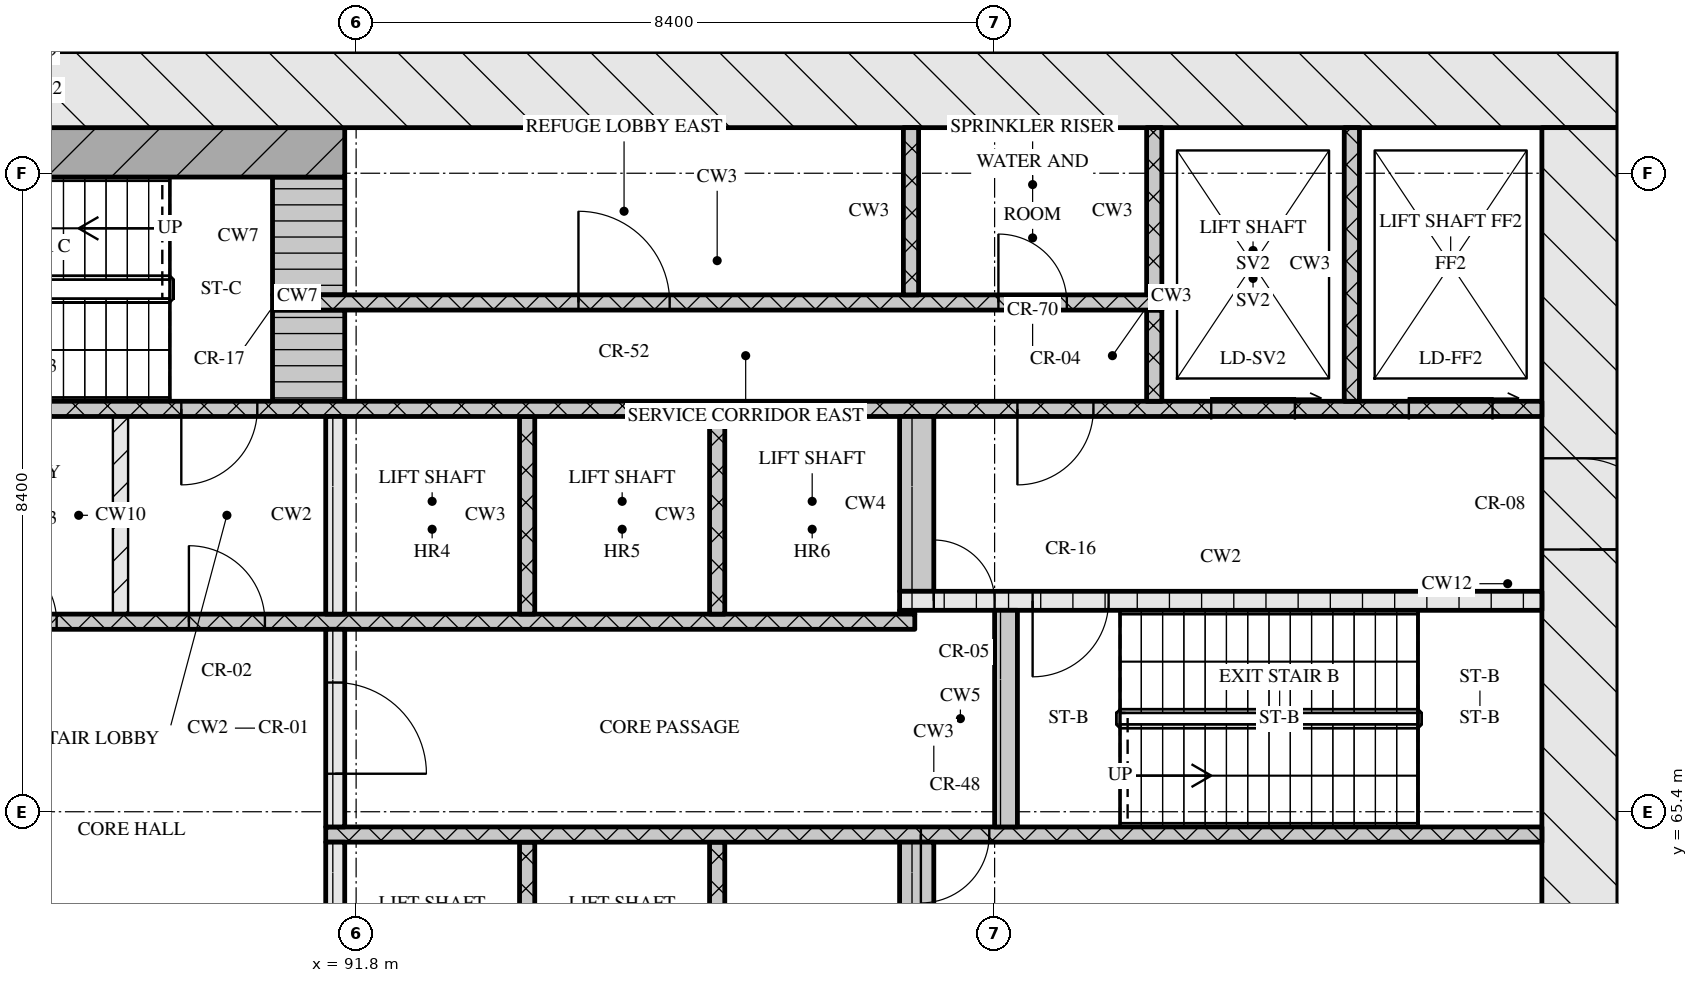
"""IFC4 building model, lengths in metres.
Left out: names, types, materials, properties, quantities, classifications, styles, units other than length and angle.
Written with IfcOpenShell. Run it as: python <this file> out.ifc"""

import sys

from ifc_helpers import new_model, si_unit, direction, frame, frame_2d, origin, place, context, subcontext, project, spatial, rectangle, extrude, element, fill, save


model = new_model("IFC4")
c1 = context("Model", 3, precision=1e-05, world=origin(), true_north=direction((0.0, 1.0)))
c2 = subcontext(c1, "Body", "Model", "MODEL_VIEW")
j1 = project(units=[si_unit("LENGTHUNIT", "METRE"), si_unit("PLANEANGLEUNIT", "RADIAN")], contexts=[c1])
p1 = place(None, origin())
s1 = spatial("IfcSite", under=j1, at=p1, CompositionType="ELEMENT")
p2 = place(p1, origin())
s2 = spatial("IfcBuilding", under=s1, at=p2, CompositionType="ELEMENT")
p3 = place(p2, frame((0.0, 0.0, 84.0)))
s3 = spatial("IfcBuildingStorey", under=s2, at=p3, CompositionType="ELEMENT", Elevation=84.0)
p4 = place(p3, frame((66.8, 74.9, 0.0), z_axis=(0.0, 0.0, 1.0), x_axis=(1.0, 0.0, 0.0)))
e1 = element("IfcWall", 1, at=p4, inside=s3, PredefinedType="SOLIDWALL", context=c2, shape_type="SweptSolid", body=[
    extrude(rectangle(XDim=41.6, YDim=1.0, at=frame_2d((20.8, 0.0))), origin(), (0.0, 0.0, 1.0), 10.97),
])
p5 = place(p3, frame((107.9, 62.4, 0.0), z_axis=(0.0, 0.0, 1.0), x_axis=(0.0, 1.0, 0.0)))
e2 = element("IfcWall", 2, at=p5, inside=s3, PredefinedType="SOLIDWALL", context=c2, shape_type="SweptSolid", body=[
    extrude(rectangle(XDim=12.0, YDim=1.0, at=frame_2d((6.0, 0.0))), origin(), (0.0, 0.0, 1.0), 10.97),
])
p6 = place(p5, frame((6.45, 0.0, 0.0)))
e3 = element("IfcOpeningElement", 3, at=p6, cuts=e2, PredefinedType="OPENING", context=c2, shape_type="SweptSolid", body=[
    extrude(rectangle(XDim=1.2, YDim=2.1, at=frame_2d((0.6, 1.05))), frame((0.0, 0.51, 0.0), z_axis=(0.0, -1.0, 0.0), x_axis=(1.0, 0.0, 0.0)), (0.0, 0.0, 1.0), 1.02),
])
p7 = place(p3, frame((91.525, 62.4, 0.0), z_axis=(0.0, 0.0, 1.0), x_axis=(0.0, 1.0, 0.0)))
e4 = element("IfcWall", 4, at=p7, inside=s3, PredefinedType="SOLIDWALL", context=c2, shape_type="SweptSolid", body=[
    extrude(rectangle(XDim=2.6, YDim=0.25, at=frame_2d((1.3, 0.0))), origin(), (0.0, 0.0, 1.0), 10.97),
])
for number, where, z_axis, x_axis in (
    (5, (94.05, 62.4, 0.0), (0.0, 0.0, 1.0), (0.0, 1.0, 0.0)),
    (6, (96.55, 62.4, 0.0), (0.0, 0.0, 1.0), (0.0, 1.0, 0.0)),
):
    element("IfcWall", number, at=place(p3, frame(where, z_axis=z_axis, x_axis=x_axis)), inside=s3, PredefinedType="SOLIDWALL", context=c2, shape_type="SweptSolid", body=[
        extrude(rectangle(XDim=2.6, YDim=0.2, at=frame_2d((1.3, 0.0))), origin(), (0.0, 0.0, 1.0), 10.97),
    ])
p8 = place(p3, frame((99.175, 62.4, 0.0), z_axis=(0.0, 0.0, 1.0), x_axis=(0.0, 1.0, 0.0)))
e7 = element("IfcWall", 7, at=p8, inside=s3, PredefinedType="SOLIDWALL", context=c2, shape_type="SweptSolid", body=[
    extrude(rectangle(XDim=2.6, YDim=0.45, at=frame_2d((1.3, 0.0))), origin(), (0.0, 0.0, 1.0), 10.97),
])
p9 = place(p3, frame((91.4, 65.1, 0.0), z_axis=(0.0, 0.0, 1.0), x_axis=(1.0, 0.0, 0.0)))
e8 = element("IfcWall", 8, at=p9, inside=s3, PredefinedType="SOLIDWALL", context=c2, shape_type="SweptSolid", body=[
    extrude(rectangle(XDim=16.0, YDim=0.2, at=frame_2d((8.0, 0.0))), origin(), (0.0, 0.0, 1.0), 10.97),
])
p10 = place(p9, frame((7.83, 0.0, 0.0)))
e9 = element("IfcOpeningElement", 9, at=p10, cuts=e8, PredefinedType="OPENING", context=c2, shape_type="SweptSolid", body=[
    extrude(rectangle(XDim=0.9, YDim=2.1, at=frame_2d((0.45, 1.05))), frame((0.0, 0.11, 0.0), z_axis=(0.0, -1.0, 0.0), x_axis=(1.0, 0.0, 0.0)), (0.0, 0.0, 1.0), 0.22),
])
p11 = place(p3, frame((91.525, 65.2, 0.0), z_axis=(0.0, 0.0, 1.0), x_axis=(0.0, 1.0, 0.0)))
e10 = element("IfcWall", 10, at=p11, inside=s3, PredefinedType="SOLIDWALL", context=c2, shape_type="SweptSolid", body=[
    extrude(rectangle(XDim=2.6, YDim=0.25, at=frame_2d((1.3, 0.0))), origin(), (0.0, 0.0, 1.0), 10.97),
])
p12 = place(p11, frame((0.7, 0.0, 0.0)))
e11 = element("IfcOpeningElement", 11, at=p12, cuts=e10, PredefinedType="OPENING", context=c2, shape_type="SweptSolid", body=[
    extrude(rectangle(XDim=1.2, YDim=2.1, at=frame_2d((0.6, 1.05))), frame((0.0, 0.135, 0.0), z_axis=(0.0, -1.0, 0.0), x_axis=(1.0, 0.0, 0.0)), (0.0, 0.0, 1.0), 0.27),
])
p13 = place(p3, frame((100.35, 65.2, 0.0), z_axis=(0.0, 0.0, 1.0), x_axis=(0.0, 1.0, 0.0)))
e12 = element("IfcWall", 12, at=p13, inside=s3, PredefinedType="SOLIDWALL", context=c2, shape_type="SweptSolid", body=[
    extrude(rectangle(XDim=2.85, YDim=0.3, at=frame_2d((1.425, 0.0))), origin(), (0.0, 0.0, 1.0), 10.97),
])
p14 = place(p3, frame((76.05, 67.9, 0.0), z_axis=(0.0, 0.0, 1.0), x_axis=(1.0, 0.0, 0.0)))
e13 = element("IfcWall", 13, at=p14, inside=s3, PredefinedType="SOLIDWALL", context=c2, shape_type="SweptSolid", body=[
    extrude(rectangle(XDim=23.1, YDim=0.2, at=frame_2d((11.55, 0.0))), origin(), (0.0, 0.0, 1.0), 10.97),
])
p15 = place(p14, frame((0.6, 0.0, 0.0)))
e14 = element("IfcOpeningElement", 14, at=p15, cuts=e13, PredefinedType="OPENING", context=c2, shape_type="SweptSolid", body=[
    extrude(rectangle(XDim=1.1, YDim=2.1, at=frame_2d((0.55, 1.05))), frame((0.0, 0.11, 0.0), z_axis=(0.0, -1.0, 0.0), x_axis=(1.0, 0.0, 0.0)), (0.0, 0.0, 1.0), 0.22),
])
p16 = place(p14, frame((3.1, 0.0, 0.0)))
e15 = element("IfcOpeningElement", 15, at=p16, cuts=e13, PredefinedType="OPENING", context=c2, shape_type="SweptSolid", body=[
    extrude(rectangle(XDim=1.1, YDim=2.1, at=frame_2d((0.55, 1.05))), frame((0.0, 0.11, 0.0), z_axis=(0.0, -1.0, 0.0), x_axis=(1.0, 0.0, 0.0)), (0.0, 0.0, 1.0), 0.22),
])
p17 = place(p14, frame((5.6, 0.0, 0.0)))
e16 = element("IfcOpeningElement", 16, at=p17, cuts=e13, PredefinedType="OPENING", context=c2, shape_type="SweptSolid", body=[
    extrude(rectangle(XDim=1.1, YDim=2.1, at=frame_2d((0.55, 1.05))), frame((0.0, 0.11, 0.0), z_axis=(0.0, -1.0, 0.0), x_axis=(1.0, 0.0, 0.0)), (0.0, 0.0, 1.0), 0.22),
])
p18 = place(p14, frame((8.45, 0.0, 0.0)))
e17 = element("IfcOpeningElement", 17, at=p18, cuts=e13, PredefinedType="OPENING", context=c2, shape_type="SweptSolid", body=[
    extrude(rectangle(XDim=0.9, YDim=2.1, at=frame_2d((0.45, 1.05))), frame((0.0, 0.11, 0.0), z_axis=(0.0, -1.0, 0.0), x_axis=(1.0, 0.0, 0.0)), (0.0, 0.0, 1.0), 0.22),
])
p19 = place(p14, frame((10.91, 0.0, 0.0)))
e18 = element("IfcOpeningElement", 18, at=p19, cuts=e13, PredefinedType="OPENING", context=c2, shape_type="SweptSolid", body=[
    extrude(rectangle(XDim=0.9, YDim=2.1, at=frame_2d((0.45, 1.05))), frame((0.0, 0.11, 0.0), z_axis=(0.0, -1.0, 0.0), x_axis=(1.0, 0.0, 0.0)), (0.0, 0.0, 1.0), 0.22),
])
p20 = place(p14, frame((13.55, 0.0, 0.0)))
e19 = element("IfcOpeningElement", 19, at=p20, cuts=e13, PredefinedType="OPENING", context=c2, shape_type="SweptSolid", body=[
    extrude(rectangle(XDim=1.0, YDim=2.1, at=frame_2d((0.5, 1.05))), frame((0.0, 0.11, 0.0), z_axis=(0.0, -1.0, 0.0), x_axis=(1.0, 0.0, 0.0)), (0.0, 0.0, 1.0), 0.22),
])
p21 = place(p3, frame((88.7, 68.0, 0.0), z_axis=(0.0, 0.0, 1.0), x_axis=(0.0, 1.0, 0.0)))
e20 = element("IfcWall", 20, at=p21, inside=s3, PredefinedType="PARTITIONING", context=c2, shape_type="SweptSolid", body=[
    extrude(rectangle(XDim=2.6, YDim=0.2, at=frame_2d((1.3, 0.0))), origin(), (0.0, 0.0, 1.0), 10.97),
])
p22 = place(p3, frame((91.525, 68.0, 0.0), z_axis=(0.0, 0.0, 1.0), x_axis=(0.0, 1.0, 0.0)))
e21 = element("IfcWall", 21, at=p22, inside=s3, PredefinedType="SOLIDWALL", context=c2, shape_type="SweptSolid", body=[
    extrude(rectangle(XDim=2.6, YDim=0.25, at=frame_2d((1.3, 0.0))), origin(), (0.0, 0.0, 1.0), 10.97),
])
for number, where, z_axis, x_axis in (
    (22, (94.05, 68.0, 0.0), (0.0, 0.0, 1.0), (0.0, 1.0, 0.0)),
    (23, (96.55, 68.0, 0.0), (0.0, 0.0, 1.0), (0.0, 1.0, 0.0)),
):
    element("IfcWall", number, at=place(p3, frame(where, z_axis=z_axis, x_axis=x_axis)), inside=s3, PredefinedType="SOLIDWALL", context=c2, shape_type="SweptSolid", body=[
        extrude(rectangle(XDim=2.6, YDim=0.2, at=frame_2d((1.3, 0.0))), origin(), (0.0, 0.0, 1.0), 10.97),
    ])
p23 = place(p3, frame((98.95, 68.025, 0.0), z_axis=(0.0, 0.0, 1.0), x_axis=(1.0, 0.0, 0.0)))
e24 = element("IfcWall", 24, at=p23, inside=s3, PredefinedType="SOLIDWALL", context=c2, shape_type="SweptSolid", body=[
    extrude(rectangle(XDim=0.2, YDim=0.05, at=frame_2d((0.1, 0.0))), origin(), (0.0, 0.0, 1.0), 10.97),
])
p24 = place(p3, frame((98.95, 68.175, 0.0), z_axis=(0.0, 0.0, 1.0), x_axis=(1.0, 0.0, 0.0)))
e25 = element("IfcWall", 25, at=p24, inside=s3, PredefinedType="SOLIDWALL", context=c2, shape_type="SweptSolid", body=[
    extrude(rectangle(XDim=8.45, YDim=0.25, at=frame_2d((4.225, 0.0))), origin(), (0.0, 0.0, 1.0), 10.97),
])
p25 = place(p24, frame((0.45, 0.0, 0.0)))
e26 = element("IfcOpeningElement", 26, at=p25, cuts=e25, PredefinedType="OPENING", context=c2, shape_type="SweptSolid", body=[
    extrude(rectangle(XDim=0.8, YDim=2.1, at=frame_2d((0.4, 1.05))), frame((0.0, 0.135, 0.0), z_axis=(0.0, -1.0, 0.0), x_axis=(1.0, 0.0, 0.0)), (0.0, 0.0, 1.0), 0.27),
])
p26 = place(p24, frame((1.75, 0.0, 0.0)))
e27 = element("IfcOpeningElement", 27, at=p26, cuts=e25, PredefinedType="OPENING", context=c2, shape_type="SweptSolid", body=[
    extrude(rectangle(XDim=1.0, YDim=2.1, at=frame_2d((0.5, 1.05))), frame((0.0, 0.135, 0.0), z_axis=(0.0, -1.0, 0.0), x_axis=(1.0, 0.0, 0.0)), (0.0, 0.0, 1.0), 0.27),
])
p27 = place(p3, frame((99.175, 68.3, 0.0), z_axis=(0.0, 0.0, 1.0), x_axis=(0.0, 1.0, 0.0)))
e28 = element("IfcWall", 28, at=p27, inside=s3, PredefinedType="SOLIDWALL", context=c2, shape_type="SweptSolid", body=[
    extrude(rectangle(XDim=2.3, YDim=0.45, at=frame_2d((1.15, 0.0))), origin(), (0.0, 0.0, 1.0), 10.97),
])
p28 = place(p3, frame((67.8, 70.7, 0.0), z_axis=(0.0, 0.0, 1.0), x_axis=(1.0, 0.0, 0.0)))
e29 = element("IfcWall", 29, at=p28, inside=s3, PredefinedType="SOLIDWALL", context=c2, shape_type="SweptSolid", body=[
    extrude(rectangle(XDim=39.6, YDim=0.2, at=frame_2d((19.8, 0.0))), origin(), (0.0, 0.0, 1.0), 10.97),
])
p29 = place(p28, frame((0.65, 0.0, 0.0)))
e30 = element("IfcOpeningElement", 30, at=p29, cuts=e29, PredefinedType="OPENING", context=c2, shape_type="SweptSolid", body=[
    extrude(rectangle(XDim=1.1, YDim=2.1, at=frame_2d((0.55, 1.05))), frame((0.0, 0.11, 0.0), z_axis=(0.0, -1.0, 0.0), x_axis=(1.0, 0.0, 0.0)), (0.0, 0.0, 1.0), 0.22),
])
p30 = place(p28, frame((3.25, 0.0, 0.0)))
e31 = element("IfcOpeningElement", 31, at=p30, cuts=e29, PredefinedType="OPENING", context=c2, shape_type="SweptSolid", body=[
    extrude(rectangle(XDim=1.1, YDim=2.1, at=frame_2d((0.55, 1.05))), frame((0.0, 0.11, 0.0), z_axis=(0.0, -1.0, 0.0), x_axis=(1.0, 0.0, 0.0)), (0.0, 0.0, 1.0), 0.22),
])
p31 = place(p28, frame((5.9, 0.0, 0.0)))
e32 = element("IfcOpeningElement", 32, at=p31, cuts=e29, PredefinedType="OPENING", context=c2, shape_type="SweptSolid", body=[
    extrude(rectangle(XDim=1.0, YDim=2.1, at=frame_2d((0.5, 1.05))), frame((0.0, 0.11, 0.0), z_axis=(0.0, -1.0, 0.0), x_axis=(1.0, 0.0, 0.0)), (0.0, 0.0, 1.0), 0.22),
])
p32 = place(p28, frame((21.7, 0.0, 0.0)))
e33 = element("IfcOpeningElement", 33, at=p32, cuts=e29, PredefinedType="OPENING", context=c2, shape_type="SweptSolid", body=[
    extrude(rectangle(XDim=1.0, YDim=2.1, at=frame_2d((0.5, 1.05))), frame((0.0, 0.11, 0.0), z_axis=(0.0, -1.0, 0.0), x_axis=(1.0, 0.0, 0.0)), (0.0, 0.0, 1.0), 0.22),
])
p33 = place(p28, frame((32.7, 0.0, 0.0)))
e34 = element("IfcOpeningElement", 34, at=p33, cuts=e29, PredefinedType="OPENING", context=c2, shape_type="SweptSolid", body=[
    extrude(rectangle(XDim=1.0, YDim=2.1, at=frame_2d((0.5, 1.05))), frame((0.0, 0.11, 0.0), z_axis=(0.0, -1.0, 0.0), x_axis=(1.0, 0.0, 0.0)), (0.0, 0.0, 1.0), 0.22),
])
p34 = place(p28, frame((35.25, 0.0, 0.0)))
e35 = element("IfcOpeningElement", 35, at=p34, cuts=e29, PredefinedType="OPENING", context=c2, shape_type="SweptSolid", body=[
    extrude(rectangle(XDim=1.1, YDim=2.1, at=frame_2d((0.55, 1.05))), frame((0.0, 0.11, 0.0), z_axis=(0.0, -1.0, 0.0), x_axis=(1.0, 0.0, 0.0)), (0.0, 0.0, 1.0), 0.22),
])
p35 = place(p28, frame((37.85, 0.0, 0.0)))
e36 = element("IfcOpeningElement", 36, at=p35, cuts=e29, PredefinedType="OPENING", context=c2, shape_type="SweptSolid", body=[
    extrude(rectangle(XDim=1.1, YDim=2.1, at=frame_2d((0.55, 1.05))), frame((0.0, 0.11, 0.0), z_axis=(0.0, -1.0, 0.0), x_axis=(1.0, 0.0, 0.0)), (0.0, 0.0, 1.0), 0.22),
])
p36 = place(p3, frame((91.175, 70.8, 0.0), z_axis=(0.0, 0.0, 1.0), x_axis=(0.0, 1.0, 0.0)))
e37 = element("IfcWall", 37, at=p36, inside=s3, PredefinedType="SOLIDWALL", context=c2, shape_type="SweptSolid", body=[
    extrude(rectangle(XDim=1.2, YDim=0.95, at=frame_2d((0.6, 0.0))), origin(), (0.0, 0.0, 1.0), 10.97),
])
p37 = place(p3, frame((102.3, 70.8, 0.0), z_axis=(0.0, 0.0, 1.0), x_axis=(0.0, 1.0, 0.0)))
e38 = element("IfcWall", 38, at=p37, inside=s3, PredefinedType="SOLIDWALL", context=c2, shape_type="SweptSolid", body=[
    extrude(rectangle(XDim=1.2, YDim=0.2, at=frame_2d((0.6, 0.0))), origin(), (0.0, 0.0, 1.0), 10.97),
])
p38 = place(p3, frame((104.9, 70.8, 0.0), z_axis=(0.0, 0.0, 1.0), x_axis=(0.0, 1.0, 0.0)))
e39 = element("IfcWall", 39, at=p38, inside=s3, PredefinedType="SOLIDWALL", context=c2, shape_type="SweptSolid", body=[
    extrude(rectangle(XDim=3.6, YDim=0.2, at=frame_2d((1.8, 0.0))), origin(), (0.0, 0.0, 1.0), 10.97),
])
p39 = place(p3, frame((90.7, 72.1, 0.0), z_axis=(0.0, 0.0, 1.0), x_axis=(1.0, 0.0, 0.0)))
e40 = element("IfcWall", 40, at=p39, inside=s3, PredefinedType="SOLIDWALL", context=c2, shape_type="SweptSolid", body=[
    extrude(rectangle(XDim=11.7, YDim=0.2, at=frame_2d((5.85, 0.0))), origin(), (0.0, 0.0, 1.0), 10.97),
])
p40 = place(p39, frame((4.025, 0.0, 0.0)))
e41 = element("IfcOpeningElement", 41, at=p40, cuts=e40, PredefinedType="OPENING", context=c2, shape_type="SweptSolid", body=[
    extrude(rectangle(XDim=1.2, YDim=2.1, at=frame_2d((0.6, 1.05))), frame((0.0, 0.11, 0.0), z_axis=(0.0, -1.0, 0.0), x_axis=(1.0, 0.0, 0.0)), (0.0, 0.0, 1.0), 0.22),
])
p41 = place(p39, frame((9.55, 0.0, 0.0)))
e42 = element("IfcOpeningElement", 42, at=p41, cuts=e40, PredefinedType="OPENING", context=c2, shape_type="SweptSolid", body=[
    extrude(rectangle(XDim=0.9, YDim=2.1, at=frame_2d((0.45, 1.05))), frame((0.0, 0.11, 0.0), z_axis=(0.0, -1.0, 0.0), x_axis=(1.0, 0.0, 0.0)), (0.0, 0.0, 1.0), 0.22),
])
p42 = place(p3, frame((91.175, 72.2, 0.0), z_axis=(0.0, 0.0, 1.0), x_axis=(0.0, 1.0, 0.0)))
e43 = element("IfcWall", 43, at=p42, inside=s3, PredefinedType="SOLIDWALL", context=c2, shape_type="SweptSolid", body=[
    extrude(rectangle(XDim=1.55, YDim=0.95, at=frame_2d((0.775, 0.0))), origin(), (0.0, 0.0, 1.0), 10.97),
])
for number, where, z_axis, x_axis in (
    (44, (99.1, 72.2, 0.0), (0.0, 0.0, 1.0), (0.0, 1.0, 0.0)),
    (45, (102.3, 72.2, 0.0), (0.0, 0.0, 1.0), (0.0, 1.0, 0.0)),
):
    element("IfcWall", number, at=place(p3, frame(where, z_axis=z_axis, x_axis=x_axis)), inside=s3, PredefinedType="SOLIDWALL", context=c2, shape_type="SweptSolid", body=[
        extrude(rectangle(XDim=2.2, YDim=0.2, at=frame_2d((1.1, 0.0))), origin(), (0.0, 0.0, 1.0), 10.97),
    ])
p43 = place(p3, frame((83.55, 74.075, 0.0), z_axis=(0.0, 0.0, 1.0), x_axis=(1.0, 0.0, 0.0)))
e46 = element("IfcWall", 46, at=p43, inside=s3, PredefinedType="SOLIDWALL", context=c2, shape_type="SweptSolid", body=[
    extrude(rectangle(XDim=8.1, YDim=0.65, at=frame_2d((4.05, 0.0))), origin(), (0.0, 0.0, 1.0), 10.97),
])
p44 = place(p10, origin())
e47 = element("IfcDoor", 47, at=p44, inside=s3, OperationType="SINGLE_SWING_RIGHT", PredefinedType="DOOR", context=c2, shape_type="SweptSolid", body=[
    extrude(rectangle(XDim=0.9, YDim=2.1, at=frame_2d((0.45, 1.05))), frame((0.0, 0.025, 0.0), z_axis=(0.0, -1.0, 0.0), x_axis=(1.0, 0.0, 0.0)), (0.0, 0.0, 1.0), 0.05),
])
fill(e9, e47)
p45 = place(p12, origin())
e48 = element("IfcDoor", 48, at=p45, inside=s3, OperationType="SINGLE_SWING_RIGHT", PredefinedType="DOOR", context=c2, shape_type="SweptSolid", body=[
    extrude(rectangle(XDim=1.2, YDim=2.1, at=frame_2d((0.6, 1.05))), frame((0.0, 0.025, 0.0), z_axis=(0.0, -1.0, 0.0), x_axis=(1.0, 0.0, 0.0)), (0.0, 0.0, 1.0), 0.05),
])
fill(e11, e48)
p46 = place(p19, origin())
e49 = element("IfcDoor", 49, at=p46, inside=s3, OperationType="SINGLE_SWING_LEFT", PredefinedType="DOOR", context=c2, shape_type="SweptSolid", body=[
    extrude(rectangle(XDim=0.9, YDim=2.1, at=frame_2d((0.45, 1.05))), frame((0.0, 0.025, 0.0), z_axis=(0.0, -1.0, 0.0), x_axis=(1.0, 0.0, 0.0)), (0.0, 0.0, 1.0), 0.05),
])
fill(e18, e49)
p47 = place(p20, origin())
e50 = element("IfcDoor", 50, at=p47, inside=s3, OperationType="SINGLE_SWING_LEFT", PredefinedType="DOOR", context=c2, shape_type="SweptSolid", body=[
    extrude(rectangle(XDim=1.0, YDim=2.1, at=frame_2d((0.5, 1.05))), frame((0.0, 0.025, 0.0), z_axis=(0.0, -1.0, 0.0), x_axis=(1.0, 0.0, 0.0)), (0.0, 0.0, 1.0), 0.05),
])
fill(e19, e50)
p48 = place(p25, origin())
e51 = element("IfcDoor", 51, at=p48, inside=s3, OperationType="SINGLE_SWING_LEFT", PredefinedType="DOOR", context=c2, shape_type="SweptSolid", body=[
    extrude(rectangle(XDim=0.8, YDim=2.1, at=frame_2d((0.4, 1.05))), frame((0.0, 0.025, 0.0), z_axis=(0.0, -1.0, 0.0), x_axis=(1.0, 0.0, 0.0)), (0.0, 0.0, 1.0), 0.05),
])
fill(e26, e51)
p49 = place(p26, origin())
e52 = element("IfcDoor", 52, at=p49, inside=s3, OperationType="SINGLE_SWING_RIGHT", PredefinedType="DOOR", context=c2, shape_type="SweptSolid", body=[
    extrude(rectangle(XDim=1.0, YDim=2.1, at=frame_2d((0.5, 1.05))), frame((0.0, 0.025, 0.0), z_axis=(0.0, -1.0, 0.0), x_axis=(1.0, 0.0, 0.0)), (0.0, 0.0, 1.0), 0.05),
])
fill(e27, e52)
p50 = place(p6, origin())
e53 = element("IfcDoor", 53, at=p50, inside=s3, OperationType="SINGLE_SWING_RIGHT", PredefinedType="DOOR", context=c2, shape_type="SweptSolid", body=[
    extrude(rectangle(XDim=1.2, YDim=2.1, at=frame_2d((0.6, 1.05))), frame((0.0, 0.025, 0.0), z_axis=(0.0, -1.0, 0.0), x_axis=(1.0, 0.0, 0.0)), (0.0, 0.0, 1.0), 0.05),
])
fill(e3, e53)
p51 = place(p32, origin())
e54 = element("IfcDoor", 54, at=p51, inside=s3, OperationType="SINGLE_SWING_RIGHT", PredefinedType="DOOR", context=c2, shape_type="SweptSolid", body=[
    extrude(rectangle(XDim=1.0, YDim=2.1, at=frame_2d((0.5, 1.05))), frame((0.0, 0.025, 0.0), z_axis=(0.0, -1.0, 0.0), x_axis=(1.0, 0.0, 0.0)), (0.0, 0.0, 1.0), 0.05),
])
fill(e33, e54)
p52 = place(p33, origin())
e55 = element("IfcDoor", 55, at=p52, inside=s3, OperationType="SINGLE_SWING_RIGHT", PredefinedType="DOOR", context=c2, shape_type="SweptSolid", body=[
    extrude(rectangle(XDim=1.0, YDim=2.1, at=frame_2d((0.5, 1.05))), frame((0.0, 0.025, 0.0), z_axis=(0.0, -1.0, 0.0), x_axis=(1.0, 0.0, 0.0)), (0.0, 0.0, 1.0), 0.05),
])
fill(e34, e55)
p53 = place(p34, origin())
e56 = element("IfcDoor", 56, at=p53, inside=s3, OperationType="SLIDING_TO_RIGHT", PredefinedType="DOOR", context=c2, shape_type="SweptSolid", body=[
    extrude(rectangle(XDim=1.1, YDim=2.1, at=frame_2d((0.55, 1.05))), frame((0.0, 0.025, 0.0), z_axis=(0.0, -1.0, 0.0), x_axis=(1.0, 0.0, 0.0)), (0.0, 0.0, 1.0), 0.05),
])
fill(e35, e56)
p54 = place(p35, origin())
e57 = element("IfcDoor", 57, at=p54, inside=s3, OperationType="SLIDING_TO_RIGHT", PredefinedType="DOOR", context=c2, shape_type="SweptSolid", body=[
    extrude(rectangle(XDim=1.1, YDim=2.1, at=frame_2d((0.55, 1.05))), frame((0.0, 0.025, 0.0), z_axis=(0.0, -1.0, 0.0), x_axis=(1.0, 0.0, 0.0)), (0.0, 0.0, 1.0), 0.05),
])
fill(e36, e57)
p55 = place(p40, origin())
e58 = element("IfcDoor", 58, at=p55, inside=s3, OperationType="SINGLE_SWING_LEFT", PredefinedType="DOOR", context=c2, shape_type="SweptSolid", body=[
    extrude(rectangle(XDim=1.2, YDim=2.1, at=frame_2d((0.6, 1.05))), frame((0.0, 0.025, 0.0), z_axis=(0.0, -1.0, 0.0), x_axis=(1.0, 0.0, 0.0)), (0.0, 0.0, 1.0), 0.05),
])
fill(e41, e58)
p56 = place(p41, origin())
e59 = element("IfcDoor", 59, at=p56, inside=s3, OperationType="SINGLE_SWING_LEFT", PredefinedType="DOOR", context=c2, shape_type="SweptSolid", body=[
    extrude(rectangle(XDim=0.9, YDim=2.1, at=frame_2d((0.45, 1.05))), frame((0.0, 0.025, 0.0), z_axis=(0.0, -1.0, 0.0), x_axis=(1.0, 0.0, 0.0)), (0.0, 0.0, 1.0), 0.05),
])
fill(e42, e59)
save(model, sys.argv[1])
